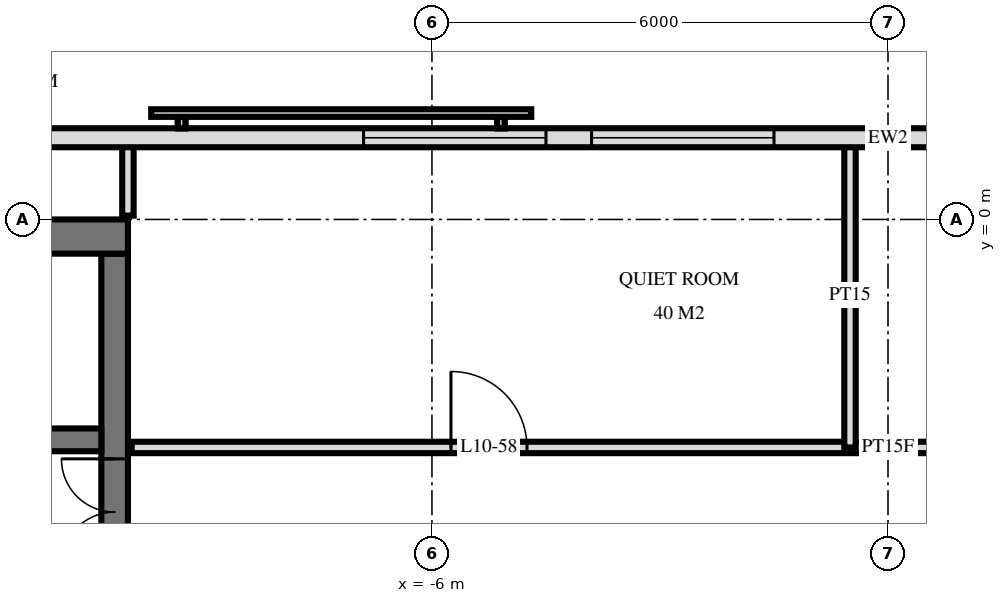
"""IFC4 building model, lengths in metres.
Left out: names, types, materials, properties, quantities, classifications, styles, units other than length and angle.
Written with IfcOpenShell. Run it as: python <this file> out.ifc"""

import sys

from ifc_helpers import new_model, si_unit, direction, frame, frame_2d, origin, place, context, subcontext, project, spatial, rectangle, extrude, element, fill, save


model = new_model("IFC4")
c1 = context("Model", 3, precision=1e-05, world=origin(), true_north=direction((0.0, 1.0)))
c2 = subcontext(c1, "Body", "Model", "MODEL_VIEW")
j1 = project(units=[si_unit("LENGTHUNIT", "METRE"), si_unit("PLANEANGLEUNIT", "RADIAN")], contexts=[c1])
p1 = place(None, origin())
s1 = spatial("IfcSite", under=j1, at=p1, CompositionType="ELEMENT")
p2 = place(p1, origin())
s2 = spatial("IfcBuilding", under=s1, at=p2, CompositionType="ELEMENT")
p3 = place(p2, frame((0.0, 0.0, 45.6)))
s3 = spatial("IfcBuildingStorey", under=s2, at=p3, CompositionType="ELEMENT", Elevation=45.6)
p4 = place(p3, frame((-29.5, -0.225, 0.0), z_axis=(0.0, 0.0, 1.0), x_axis=(1.0, 0.0, 0.0)))
e1 = element("IfcWall", 1, at=p4, inside=s3, PredefinedType="SHEAR", context=c2, shape_type="SweptSolid", body=[
    extrude(rectangle(XDim=19.5, YDim=0.45, at=frame_2d((9.75, 0.0))), origin(), (0.0, 0.0, 1.0), 3.6),
])
p5 = place(p3, frame((-10.175, -14.55, 0.0), z_axis=(0.0, 0.0, 1.0), x_axis=(0.0, 1.0, 0.0)))
e2 = element("IfcWall", 2, at=p5, inside=s3, PredefinedType="SHEAR", context=c2, shape_type="SweptSolid", body=[
    extrude(rectangle(XDim=14.1, YDim=0.35, at=frame_2d((7.05, 0.0))), origin(), (0.0, 0.0, 1.0), 3.6),
])
p6 = place(p5, frame((8.4, 0.0, 0.0)))
e3 = element("IfcOpeningElement", 3, at=p6, cuts=e2, PredefinedType="OPENING", context=c2, shape_type="SweptSolid", body=[
    extrude(rectangle(XDim=1.4, YDim=2.4, at=frame_2d((0.7, 1.2))), frame((0.0, 0.185, 0.0), z_axis=(0.0, -1.0, 0.0), x_axis=(1.0, 0.0, 0.0)), (0.0, 0.0, 1.0), 0.37),
])
p7 = place(p5, frame((10.0, 0.0, 0.0)))
e4 = element("IfcOpeningElement", 4, at=p7, cuts=e2, PredefinedType="OPENING", context=c2, shape_type="SweptSolid", body=[
    extrude(rectangle(XDim=1.4, YDim=2.4, at=frame_2d((0.7, 1.2))), frame((0.0, 0.185, 0.0), z_axis=(0.0, -1.0, 0.0), x_axis=(1.0, 0.0, 0.0)), (0.0, 0.0, 1.0), 0.37),
])
p8 = place(p5, frame((4.0, 0.0, 0.0)))
e5 = element("IfcOpeningElement", 5, at=p8, cuts=e2, PredefinedType="OPENING", context=c2, shape_type="SweptSolid", body=[
    extrude(rectangle(XDim=1.2, YDim=2.1, at=frame_2d((0.6, 1.05))), frame((0.0, 0.185, 0.0), z_axis=(0.0, -1.0, 0.0), x_axis=(1.0, 0.0, 0.0)), (0.0, 0.0, 1.0), 0.37),
])
p9 = place(p3, frame((-29.05, -2.9, 0.0), z_axis=(0.0, 0.0, 1.0), x_axis=(1.0, 0.0, 0.0)))
e6 = element("IfcWall", 6, at=p9, inside=s3, PredefinedType="SHEAR", context=c2, shape_type="SweptSolid", body=[
    extrude(rectangle(XDim=18.7, YDim=0.3, at=frame_2d((9.35, 0.0))), origin(), (0.0, 0.0, 1.0), 3.6),
])
p10 = place(p9, frame((2.95, 0.0, 0.0)))
e7 = element("IfcOpeningElement", 7, at=p10, cuts=e6, PredefinedType="OPENING", context=c2, shape_type="SweptSolid", body=[
    extrude(rectangle(XDim=1.1, YDim=2.1, at=frame_2d((0.55, 1.05))), frame((0.0, 0.16, 0.0), z_axis=(0.0, -1.0, 0.0), x_axis=(1.0, 0.0, 0.0)), (0.0, 0.0, 1.0), 0.32),
])
p11 = place(p9, frame((0.55, 0.0, 0.0)))
e8 = element("IfcOpeningElement", 8, at=p11, cuts=e6, PredefinedType="OPENING", context=c2, shape_type="SweptSolid", body=[
    extrude(rectangle(XDim=1.1, YDim=2.1, at=frame_2d((0.55, 1.05))), frame((0.0, 0.16, 0.0), z_axis=(0.0, -1.0, 0.0), x_axis=(1.0, 0.0, 0.0)), (0.0, 0.0, 1.0), 0.32),
])
p12 = place(p9, frame((10.9, 0.0, 0.0)))
e9 = element("IfcOpeningElement", 9, at=p12, cuts=e6, PredefinedType="OPENING", context=c2, shape_type="SweptSolid", body=[
    extrude(rectangle(XDim=0.9, YDim=2.1, at=frame_2d((0.45, 1.05))), frame((0.0, 0.16, 0.0), z_axis=(0.0, -1.0, 0.0), x_axis=(1.0, 0.0, 0.0)), (0.0, 0.0, 1.0), 0.32),
])
p13 = place(p9, frame((16.85, 0.0, 0.0)))
e10 = element("IfcOpeningElement", 10, at=p13, cuts=e6, PredefinedType="OPENING", context=c2, shape_type="SweptSolid", body=[
    extrude(rectangle(XDim=1.0, YDim=2.1, at=frame_2d((0.5, 1.05))), frame((0.0, 0.16, 0.0), z_axis=(0.0, -1.0, 0.0), x_axis=(1.0, 0.0, 0.0)), (0.0, 0.0, 1.0), 0.32),
])
p14 = place(p9, frame((14.312, 0.0, 0.0)))
e11 = element("IfcOpeningElement", 11, at=p14, cuts=e6, PredefinedType="OPENING", context=c2, shape_type="SweptSolid", body=[
    extrude(rectangle(XDim=1.0, YDim=2.1, at=frame_2d((0.5, 1.05))), frame((0.0, 0.16, 0.0), z_axis=(0.0, -1.0, 0.0), x_axis=(1.0, 0.0, 0.0)), (0.0, 0.0, 1.0), 0.32),
])
p15 = place(p9, frame((12.887, 0.0, 0.0)))
e12 = element("IfcOpeningElement", 12, at=p15, cuts=e6, PredefinedType="OPENING", context=c2, shape_type="SweptSolid", body=[
    extrude(rectangle(XDim=1.0, YDim=2.1, at=frame_2d((0.5, 1.05))), frame((0.0, 0.16, 0.0), z_axis=(0.0, -1.0, 0.0), x_axis=(1.0, 0.0, 0.0)), (0.0, 0.0, 1.0), 0.32),
])
p16 = place(p9, frame((5.6, 0.0, 0.0)))
e13 = element("IfcOpeningElement", 13, at=p16, cuts=e6, PredefinedType="OPENING", context=c2, shape_type="SweptSolid", body=[
    extrude(rectangle(XDim=1.0, YDim=2.1, at=frame_2d((0.5, 1.05))), frame((0.0, 0.16, 0.0), z_axis=(0.0, -1.0, 0.0), x_axis=(1.0, 0.0, 0.0)), (0.0, 0.0, 1.0), 0.32),
])
p17 = place(p3, frame((28.775, 1.075, 0.0), z_axis=(0.0, 0.0, 1.0), x_axis=(-1.0, 0.0, 0.0)))
e14 = element("IfcWall", 14, at=p17, inside=s3, PredefinedType="SOLIDWALL", context=c2, shape_type="SweptSolid", body=[
    extrude(rectangle(XDim=57.551, YDim=0.25, at=frame_2d((28.775, 0.0))), origin(), (0.0, 0.0, 1.0), 3.32),
])
p18 = place(p17, frame((25.575, 0.0, 0.3)))
e15 = element("IfcOpeningElement", 15, at=p18, cuts=e14, PredefinedType="OPENING", context=c2, shape_type="SweptSolid", body=[
    extrude(rectangle(XDim=2.4, YDim=2.1, at=frame_2d((1.2, 1.05))), frame((0.0, 0.135, 0.0), z_axis=(0.0, -1.0, 0.0), x_axis=(1.0, 0.0, 0.0)), (0.0, 0.0, 1.0), 0.27),
])
p19 = place(p17, frame((30.275, 0.0, 0.3)))
e16 = element("IfcOpeningElement", 16, at=p19, cuts=e14, PredefinedType="OPENING", context=c2, shape_type="SweptSolid", body=[
    extrude(rectangle(XDim=2.4, YDim=2.1, at=frame_2d((1.2, 1.05))), frame((0.0, 0.135, 0.0), z_axis=(0.0, -1.0, 0.0), x_axis=(1.0, 0.0, 0.0)), (0.0, 0.0, 1.0), 0.27),
])
p20 = place(p17, frame((33.275, 0.0, 0.3)))
e17 = element("IfcOpeningElement", 17, at=p20, cuts=e14, PredefinedType="OPENING", context=c2, shape_type="SweptSolid", body=[
    extrude(rectangle(XDim=2.4, YDim=2.1, at=frame_2d((1.2, 1.05))), frame((0.0, 0.135, 0.0), z_axis=(0.0, -1.0, 0.0), x_axis=(1.0, 0.0, 0.0)), (0.0, 0.0, 1.0), 0.27),
])
p21 = place(p3, frame((-0.5, -3.0, 0.0), z_axis=(0.0, 0.0, 1.0), x_axis=(0.0, 1.0, 0.0)))
e18 = element("IfcWall", 18, at=p21, inside=s3, PredefinedType="PARTITIONING", context=c2, shape_type="SweptSolid", body=[
    extrude(rectangle(XDim=4.02, YDim=0.15, at=frame_2d((2.01, 0.0))), origin(), (0.0, 0.0, 1.0), 3.32),
])
p22 = place(p3, frame((-10.0, 0.05, 0.0), z_axis=(0.0, 0.0, 1.0), x_axis=(0.0, 1.0, 0.0)))
e19 = element("IfcWall", 19, at=p22, inside=s3, PredefinedType="PARTITIONING", context=c2, shape_type="SweptSolid", body=[
    extrude(rectangle(XDim=0.97, YDim=0.15, at=frame_2d((0.485, 0.0))), origin(), (0.0, 0.0, 1.0), 3.32),
])
p23 = place(p3, frame((-9.95, -3.0, 0.0), z_axis=(0.0, 0.0, 1.0), x_axis=(1.0, 0.0, 0.0)))
e20 = element("IfcWall", 20, at=p23, inside=s3, PredefinedType="PARTITIONING", context=c2, shape_type="SweptSolid", body=[
    extrude(rectangle(XDim=19.9, YDim=0.15, at=frame_2d((9.95, 0.0))), origin(), (0.0, 0.0, 1.0), 3.32),
])
p24 = place(p23, frame((4.2, 0.0, 0.0)))
e21 = element("IfcOpeningElement", 21, at=p24, cuts=e20, PredefinedType="OPENING", context=c2, shape_type="SweptSolid", body=[
    extrude(rectangle(XDim=1.0, YDim=2.1, at=frame_2d((0.5, 1.05))), frame((0.0, 0.085, 0.0), z_axis=(0.0, -1.0, 0.0), x_axis=(1.0, 0.0, 0.0)), (0.0, 0.0, 1.0), 0.17),
])
p25 = place(p23, frame((11.45, 0.0, 0.0)))
e22 = element("IfcOpeningElement", 22, at=p25, cuts=e20, PredefinedType="OPENING", context=c2, shape_type="SweptSolid", body=[
    extrude(rectangle(XDim=1.0, YDim=2.1, at=frame_2d((0.5, 1.05))), frame((0.0, 0.085, 0.0), z_axis=(0.0, -1.0, 0.0), x_axis=(1.0, 0.0, 0.0)), (0.0, 0.0, 1.0), 0.17),
])
p26 = place(p23, frame((15.45, 0.0, 0.0)))
e23 = element("IfcOpeningElement", 23, at=p26, cuts=e20, PredefinedType="OPENING", context=c2, shape_type="SweptSolid", body=[
    extrude(rectangle(XDim=1.0, YDim=2.1, at=frame_2d((0.5, 1.05))), frame((0.0, 0.085, 0.0), z_axis=(0.0, -1.0, 0.0), x_axis=(1.0, 0.0, 0.0)), (0.0, 0.0, 1.0), 0.17),
])
p27 = place(p23, frame((18.2, 0.0, 0.0)))
e24 = element("IfcOpeningElement", 24, at=p27, cuts=e20, PredefinedType="OPENING", context=c2, shape_type="SweptSolid", body=[
    extrude(rectangle(XDim=1.0, YDim=2.1, at=frame_2d((0.5, 1.05))), frame((0.0, 0.085, 0.0), z_axis=(0.0, -1.0, 0.0), x_axis=(1.0, 0.0, 0.0)), (0.0, 0.0, 1.0), 0.17),
])
p28 = place(p19, origin())
e25 = element("IfcWindow", 25, at=p28, inside=s3, PartitioningType="SINGLE_PANEL", PredefinedType="WINDOW", context=c2, shape_type="SweptSolid", body=[
    extrude(rectangle(XDim=2.4, YDim=2.1, at=frame_2d((1.2, 1.05))), frame((0.0, 0.03, 0.0), z_axis=(0.0, -1.0, 0.0), x_axis=(1.0, 0.0, 0.0)), (0.0, 0.0, 1.0), 0.06),
])
fill(e16, e25)
p29 = place(p20, origin())
e26 = element("IfcWindow", 26, at=p29, inside=s3, PartitioningType="SINGLE_PANEL", PredefinedType="WINDOW", context=c2, shape_type="SweptSolid", body=[
    extrude(rectangle(XDim=2.4, YDim=2.1, at=frame_2d((1.2, 1.05))), frame((0.0, 0.03, 0.0), z_axis=(0.0, -1.0, 0.0), x_axis=(1.0, 0.0, 0.0)), (0.0, 0.0, 1.0), 0.06),
])
fill(e17, e26)
p30 = place(p7, origin())
e27 = element("IfcDoor", 27, at=p30, inside=s3, OperationType="DOUBLE_DOOR_SINGLE_SWING", PredefinedType="DOOR", context=c2, shape_type="SweptSolid", body=[
    extrude(rectangle(XDim=1.4, YDim=2.4, at=frame_2d((0.7, 1.2))), frame((0.0, 0.025, 0.0), z_axis=(0.0, -1.0, 0.0), x_axis=(1.0, 0.0, 0.0)), (0.0, 0.0, 1.0), 0.05),
])
fill(e4, e27)
p31 = place(p24, origin())
e28 = element("IfcDoor", 28, at=p31, inside=s3, OperationType="SINGLE_SWING_RIGHT", PredefinedType="DOOR", context=c2, shape_type="SweptSolid", body=[
    extrude(rectangle(XDim=1.0, YDim=2.1, at=frame_2d((0.5, 1.05))), frame((0.0, 0.025, 0.0), z_axis=(0.0, -1.0, 0.0), x_axis=(1.0, 0.0, 0.0)), (0.0, 0.0, 1.0), 0.05),
])
fill(e21, e28)
save(model, sys.argv[1])
